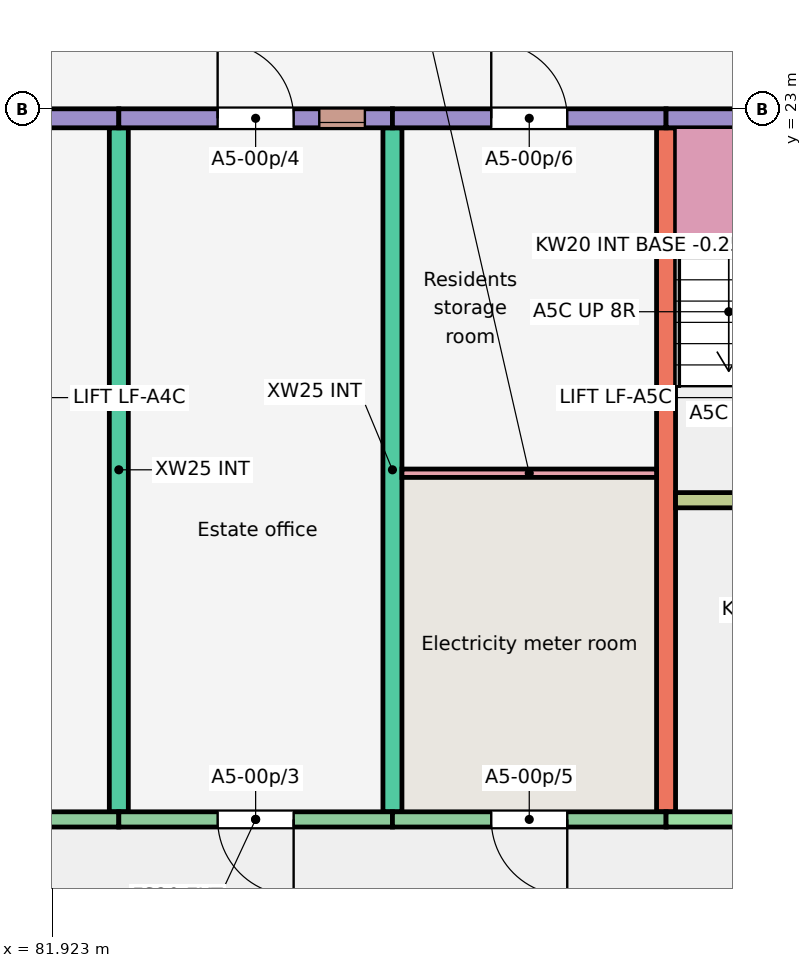
"""IFC4 building model, lengths in metres.
Left out: names, types, materials, properties, quantities, classifications, styles, units other than length and angle.
Written with IfcOpenShell. Run it as: python <this file> out.ifc"""

import sys

from ifc_helpers import new_model, si_unit, direction, frame, frame_2d, origin, place, context, subcontext, project, spatial, rectangle, extrude, element, fill, save


model = new_model("IFC4")
c1 = context("Model", 3, precision=1e-05, world=origin(), true_north=direction((0.0, 1.0)))
c2 = subcontext(c1, "Body", "Model", "MODEL_VIEW")
j1 = project(units=[si_unit("LENGTHUNIT", "METRE"), si_unit("PLANEANGLEUNIT", "RADIAN")], contexts=[c1])
p1 = place(None, origin())
s1 = spatial("IfcSite", under=j1, at=p1, CompositionType="ELEMENT")
p2 = place(p1, origin())
s2 = spatial("IfcBuilding", under=s1, at=p2, CompositionType="ELEMENT")
p3 = place(p2, origin())
s3 = spatial("IfcBuildingStorey", under=s2, at=p3, CompositionType="ELEMENT", Elevation=0.0)
for number, where, z_axis, x_axis in (
    (1, (82.8, 13.75, -0.25), (0.0, 0.0, 1.0), (0.0, 1.0, 0.0)),
    (2, (86.4, 13.75, -0.25), (0.0, 0.0, 1.0), (0.0, 1.0, 0.0)),
    (3, (90.0, 13.75, -0.25), (0.0, 0.0, 1.0), (0.0, 1.0, 0.0)),
):
    element("IfcWall", number, at=place(p3, frame(where, z_axis=z_axis, x_axis=x_axis)), inside=s3, PredefinedType="SHEAR", context=c2, shape_type="SweptSolid", body=[
        extrude(rectangle(XDim=9.0, YDim=0.25, at=frame_2d((4.5, 0.0))), origin(), (0.0, 0.0, 1.0), 3.25),
    ])
p4 = place(p3, frame((79.2, 22.875, -0.25), z_axis=(0.0, 0.0, 1.0), x_axis=(1.0, 0.0, 0.0)))
e4 = element("IfcWall", 4, at=p4, inside=s3, PredefinedType="SOLIDWALL", context=c2, shape_type="SweptSolid", body=[
    extrude(rectangle(XDim=3.6, YDim=0.25, at=frame_2d((1.8, 0.0))), origin(), (0.0, 0.0, 1.0), 3.25),
])
p5 = place(p4, frame((0.381, 0.0, 2.05)))
e5 = element("IfcOpeningElement", 5, at=p5, cuts=e4, PredefinedType="OPENING", context=c2, shape_type="SweptSolid", body=[
    extrude(rectangle(XDim=0.6, YDim=0.6, at=frame_2d((0.3, 0.3))), frame((0.0, 0.135, 0.0), z_axis=(0.0, -1.0, 0.0), x_axis=(1.0, 0.0, 0.0)), (0.0, 0.0, 1.0), 0.27),
])
p6 = place(p4, frame((1.312, 0.0, 0.25)))
e6 = element("IfcOpeningElement", 6, at=p6, cuts=e4, PredefinedType="OPENING", context=c2, shape_type="SweptSolid", body=[
    extrude(rectangle(XDim=1.0, YDim=2.1, at=frame_2d((0.5, 1.05))), frame((0.0, 0.135, 0.0), z_axis=(0.0, -1.0, 0.0), x_axis=(1.0, 0.0, 0.0)), (0.0, 0.0, 1.0), 0.27),
])
p7 = place(p3, frame((79.35, 13.65, -0.25), z_axis=(0.0, 0.0, 1.0), x_axis=(1.0, 0.0, 0.0)))
e7 = element("IfcWall", 7, at=p7, inside=s3, PredefinedType="SOLIDWALL", context=c2, shape_type="SweptSolid", body=[
    extrude(rectangle(XDim=3.45, YDim=0.2, at=frame_2d((1.725, 0.0))), origin(), (0.0, 0.0, 1.0), 3.25),
])
p8 = place(p7, frame((1.163, 0.0, 0.25)))
e8 = element("IfcOpeningElement", 8, at=p8, cuts=e7, PredefinedType="OPENING", context=c2, shape_type="SweptSolid", body=[
    extrude(rectangle(XDim=1.0, YDim=2.1, at=frame_2d((0.5, 1.05))), frame((0.0, 0.11, 0.0), z_axis=(0.0, -1.0, 0.0), x_axis=(1.0, 0.0, 0.0)), (0.0, 0.0, 1.0), 0.22),
])
p9 = place(p3, frame((82.8, 22.875, -0.25), z_axis=(0.0, 0.0, 1.0), x_axis=(1.0, 0.0, 0.0)))
e9 = element("IfcWall", 9, at=p9, inside=s3, PredefinedType="SOLIDWALL", context=c2, shape_type="SweptSolid", body=[
    extrude(rectangle(XDim=3.6, YDim=0.25, at=frame_2d((1.8, 0.0))), origin(), (0.0, 0.0, 1.0), 3.25),
])
p10 = place(p9, frame((2.637, 0.0, 2.05)))
e10 = element("IfcOpeningElement", 10, at=p10, cuts=e9, PredefinedType="OPENING", context=c2, shape_type="SweptSolid", body=[
    extrude(rectangle(XDim=0.6, YDim=0.6, at=frame_2d((0.3, 0.3))), frame((0.0, 0.135, 0.0), z_axis=(0.0, -1.0, 0.0), x_axis=(1.0, 0.0, 0.0)), (0.0, 0.0, 1.0), 0.27),
])
p11 = place(p9, frame((1.3, 0.0, 0.25)))
e11 = element("IfcOpeningElement", 11, at=p11, cuts=e9, PredefinedType="OPENING", context=c2, shape_type="SweptSolid", body=[
    extrude(rectangle(XDim=1.0, YDim=2.1, at=frame_2d((0.5, 1.05))), frame((0.0, 0.135, 0.0), z_axis=(0.0, -1.0, 0.0), x_axis=(1.0, 0.0, 0.0)), (0.0, 0.0, 1.0), 0.27),
])
p12 = place(p3, frame((82.8, 13.65, -0.25), z_axis=(0.0, 0.0, 1.0), x_axis=(1.0, 0.0, 0.0)))
e12 = element("IfcWall", 12, at=p12, inside=s3, PredefinedType="SOLIDWALL", context=c2, shape_type="SweptSolid", body=[
    extrude(rectangle(XDim=3.6, YDim=0.2, at=frame_2d((1.8, 0.0))), origin(), (0.0, 0.0, 1.0), 3.25),
])
p13 = place(p12, frame((1.3, 0.0, 0.25)))
e13 = element("IfcOpeningElement", 13, at=p13, cuts=e12, PredefinedType="OPENING", context=c2, shape_type="SweptSolid", body=[
    extrude(rectangle(XDim=1.0, YDim=2.1, at=frame_2d((0.5, 1.05))), frame((0.0, 0.11, 0.0), z_axis=(0.0, -1.0, 0.0), x_axis=(1.0, 0.0, 0.0)), (0.0, 0.0, 1.0), 0.22),
])
p14 = place(p3, frame((86.4, 22.875, -0.25), z_axis=(0.0, 0.0, 1.0), x_axis=(1.0, 0.0, 0.0)))
e14 = element("IfcWall", 14, at=p14, inside=s3, PredefinedType="SOLIDWALL", context=c2, shape_type="SweptSolid", body=[
    extrude(rectangle(XDim=3.6, YDim=0.25, at=frame_2d((1.8, 0.0))), origin(), (0.0, 0.0, 1.0), 3.25),
])
p15 = place(p14, frame((1.3, 0.0, 0.25)))
e15 = element("IfcOpeningElement", 15, at=p15, cuts=e14, PredefinedType="OPENING", context=c2, shape_type="SweptSolid", body=[
    extrude(rectangle(XDim=1.0, YDim=2.1, at=frame_2d((0.5, 1.05))), frame((0.0, 0.135, 0.0), z_axis=(0.0, -1.0, 0.0), x_axis=(1.0, 0.0, 0.0)), (0.0, 0.0, 1.0), 0.27),
])
p16 = place(p3, frame((86.4, 13.65, -0.25), z_axis=(0.0, 0.0, 1.0), x_axis=(1.0, 0.0, 0.0)))
e16 = element("IfcWall", 16, at=p16, inside=s3, PredefinedType="SOLIDWALL", context=c2, shape_type="SweptSolid", body=[
    extrude(rectangle(XDim=3.6, YDim=0.2, at=frame_2d((1.8, 0.0))), origin(), (0.0, 0.0, 1.0), 3.25),
])
p17 = place(p16, frame((1.3, 0.0, 0.25)))
e17 = element("IfcOpeningElement", 17, at=p17, cuts=e16, PredefinedType="OPENING", context=c2, shape_type="SweptSolid", body=[
    extrude(rectangle(XDim=1.0, YDim=2.1, at=frame_2d((0.5, 1.05))), frame((0.0, 0.11, 0.0), z_axis=(0.0, -1.0, 0.0), x_axis=(1.0, 0.0, 0.0)), (0.0, 0.0, 1.0), 0.22),
])
p18 = place(p3, frame((90.0, 22.875, -0.25), z_axis=(0.0, 0.0, 1.0), x_axis=(1.0, 0.0, 0.0)))
e18 = element("IfcWall", 18, at=p18, inside=s3, PredefinedType="SOLIDWALL", context=c2, shape_type="SweptSolid", body=[
    extrude(rectangle(XDim=6.0, YDim=0.25, at=frame_2d((3.0, 0.0))), origin(), (0.0, 0.0, 1.0), 3.25),
])
p19 = place(p18, frame((1.025, 0.0, 0.25)))
e19 = element("IfcOpeningElement", 19, at=p19, cuts=e18, PredefinedType="OPENING", context=c2, shape_type="SweptSolid", body=[
    extrude(rectangle(XDim=1.1, YDim=2.1, at=frame_2d((0.55, 1.05))), frame((0.0, 0.135, 0.0), z_axis=(0.0, -1.0, 0.0), x_axis=(1.0, 0.0, 0.0)), (0.0, 0.0, 1.0), 0.27),
])
p20 = place(p3, frame((90.0, 13.65, -0.25), z_axis=(0.0, 0.0, 1.0), x_axis=(1.0, 0.0, 0.0)))
e20 = element("IfcWall", 20, at=p20, inside=s3, PredefinedType="SHEAR", context=c2, shape_type="SweptSolid", body=[
    extrude(rectangle(XDim=5.85, YDim=0.2, at=frame_2d((2.925, 0.0))), origin(), (0.0, 0.0, 1.0), 3.25),
])
p21 = place(p20, frame((2.438, 0.0, 0.25)))
e21 = element("IfcOpeningElement", 21, at=p21, cuts=e20, PredefinedType="OPENING", context=c2, shape_type="SweptSolid", body=[
    extrude(rectangle(XDim=1.1, YDim=2.1, at=frame_2d((0.55, 1.05))), frame((0.0, 0.11, 0.0), z_axis=(0.0, -1.0, 0.0), x_axis=(1.0, 0.0, 0.0)), (0.0, 0.0, 1.0), 0.22),
])
p22 = place(p3, frame((90.125, 17.85, -0.25), z_axis=(0.0, 0.0, 1.0), x_axis=(1.0, 0.0, 0.0)))
e22 = element("IfcWall", 22, at=p22, inside=s3, PredefinedType="SHEAR", context=c2, shape_type="SweptSolid", body=[
    extrude(rectangle(XDim=5.725, YDim=0.2, at=frame_2d((2.863, 0.0))), origin(), (0.0, 0.0, 1.0), 3.25),
])
p23 = place(p22, frame((0.95, 0.0, 0.25)))
e23 = element("IfcOpeningElement", 23, at=p23, cuts=e22, PredefinedType="OPENING", context=c2, shape_type="SweptSolid", body=[
    extrude(rectangle(XDim=1.0, YDim=2.1, at=frame_2d((0.5, 1.05))), frame((0.0, 0.11, 0.0), z_axis=(0.0, -1.0, 0.0), x_axis=(1.0, 0.0, 0.0)), (0.0, 0.0, 1.0), 0.22),
])
p24 = place(p22, frame((3.863, 0.0, 0.25)))
e24 = element("IfcOpeningElement", 24, at=p24, cuts=e22, PredefinedType="OPENING", context=c2, shape_type="SweptSolid", body=[
    extrude(rectangle(XDim=1.1, YDim=2.1, at=frame_2d((0.55, 1.05))), frame((0.0, 0.11, 0.0), z_axis=(0.0, -1.0, 0.0), x_axis=(1.0, 0.0, 0.0)), (0.0, 0.0, 1.0), 0.22),
])
p25 = place(p3, frame((86.525, 18.205, 0.0), z_axis=(0.0, 0.0, 1.0), x_axis=(1.0, 0.0, 0.0)))
e25 = element("IfcWall", 25, at=p25, inside=s3, PredefinedType="PARTITIONING", context=c2, shape_type="SweptSolid", body=[
    extrude(rectangle(XDim=3.35, YDim=0.11, at=frame_2d((1.675, 0.0))), origin(), (0.0, 0.0, 1.0), 2.8),
])
p26 = place(p10, origin())
e26 = element("IfcWindow", 26, at=p26, inside=s3, PartitioningType="SINGLE_PANEL", PredefinedType="WINDOW", context=c2, shape_type="SweptSolid", body=[
    extrude(rectangle(XDim=0.6, YDim=0.6, at=frame_2d((0.3, 0.3))), frame((0.0, -0.025, 0.0), z_axis=(0.0, -1.0, 0.0), x_axis=(1.0, 0.0, 0.0)), (0.0, 0.0, 1.0), 0.06),
])
fill(e10, e26)
p27 = place(p13, origin())
e27 = element("IfcDoor", 27, at=p27, inside=s3, OperationType="SINGLE_SWING_RIGHT", PredefinedType="DOOR", context=c2, shape_type="SweptSolid", body=[
    extrude(rectangle(XDim=1.0, YDim=2.1, at=frame_2d((0.5, 1.05))), frame((0.0, 0.025, 0.0), z_axis=(0.0, -1.0, 0.0), x_axis=(1.0, 0.0, 0.0)), (0.0, 0.0, 1.0), 0.05),
])
fill(e13, e27)
p28 = place(p11, origin())
e28 = element("IfcDoor", 28, at=p28, inside=s3, OperationType="SINGLE_SWING_LEFT", PredefinedType="DOOR", context=c2, shape_type="SweptSolid", body=[
    extrude(rectangle(XDim=1.0, YDim=2.1, at=frame_2d((0.5, 1.05))), frame((0.0, 0.025, 0.0), z_axis=(0.0, -1.0, 0.0), x_axis=(1.0, 0.0, 0.0)), (0.0, 0.0, 1.0), 0.05),
])
fill(e11, e28)
p29 = place(p17, origin())
e29 = element("IfcDoor", 29, at=p29, inside=s3, OperationType="SINGLE_SWING_RIGHT", PredefinedType="DOOR", context=c2, shape_type="SweptSolid", body=[
    extrude(rectangle(XDim=1.0, YDim=2.1, at=frame_2d((0.5, 1.05))), frame((0.0, 0.025, 0.0), z_axis=(0.0, -1.0, 0.0), x_axis=(1.0, 0.0, 0.0)), (0.0, 0.0, 1.0), 0.05),
])
fill(e17, e29)
p30 = place(p15, origin())
e30 = element("IfcDoor", 30, at=p30, inside=s3, OperationType="SINGLE_SWING_LEFT", PredefinedType="DOOR", context=c2, shape_type="SweptSolid", body=[
    extrude(rectangle(XDim=1.0, YDim=2.1, at=frame_2d((0.5, 1.05))), frame((0.0, 0.025, 0.0), z_axis=(0.0, -1.0, 0.0), x_axis=(1.0, 0.0, 0.0)), (0.0, 0.0, 1.0), 0.05),
])
fill(e15, e30)
save(model, sys.argv[1])
